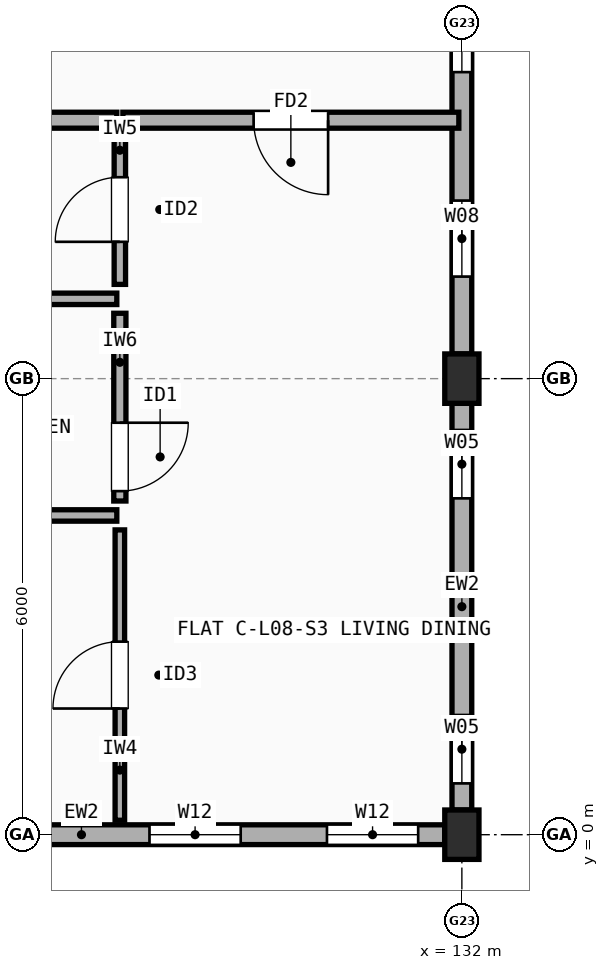
"""IFC4 building model, lengths in metres.
Left out: names, types, materials, properties, quantities, classifications, styles, units other than length and angle.
Written with IfcOpenShell. Run it as: python <this file> out.ifc"""

import sys

from ifc_helpers import new_model, si_unit, direction, frame, frame_2d, origin, origin_2d, place, context, subcontext, project, spatial, rectangle, extrude, element, fill, save


model = new_model("IFC4")
c1 = context("Model", 3, precision=1e-05, world=origin(), true_north=direction((0.0, 1.0)))
c2 = subcontext(c1, "Body", "Model", "MODEL_VIEW")
j1 = project(units=[si_unit("LENGTHUNIT", "METRE"), si_unit("PLANEANGLEUNIT", "RADIAN")], contexts=[c1])
p1 = place(None, origin())
s1 = spatial("IfcSite", under=j1, at=p1, CompositionType="ELEMENT")
p2 = place(p1, origin())
s2 = spatial("IfcBuilding", under=s1, at=p2, CompositionType="ELEMENT")
p3 = place(p2, frame((0.0, 0.0, 26.9)))
s3 = spatial("IfcBuildingStorey", under=s2, at=p3, CompositionType="ELEMENT", Elevation=26.9)
for number, where, z_axis, x_axis in (
    (1, (132.0, 0.0, 0.0), (0.0, 0.0, 1.0), (1.0, 0.0, 0.0)),
    (2, (132.0, 6.0, 0.0), (0.0, 0.0, 1.0), (1.0, 0.0, 0.0)),
):
    element("IfcColumn", number, at=place(p3, frame(where, z_axis=z_axis, x_axis=x_axis)), inside=s3, PredefinedType="COLUMN", context=c2, shape_type="SweptSolid", body=[
        extrude(rectangle(XDim=0.45, YDim=0.65, at=origin_2d()), origin(), (0.0, 0.0, 1.0), 2.98),
    ])
p4 = place(p3, frame((126.25, 0.0, 0.0), z_axis=(0.0, 0.0, 1.0), x_axis=(1.0, 0.0, 0.0)))
e3 = element("IfcWall", 3, at=p4, inside=s3, PredefinedType="STANDARD", context=c2, shape_type="SweptSolid", body=[
    extrude(rectangle(XDim=5.525, YDim=0.26, at=frame_2d((2.762, 0.0))), origin(), (0.0, 0.0, 1.0), 2.462),
])
p5 = place(p4, frame((1.64, 0.0, 0.9)))
e4 = element("IfcOpeningElement", 4, at=p5, cuts=e3, PredefinedType="OPENING", context=c2, shape_type="SweptSolid", body=[
    extrude(rectangle(XDim=1.2, YDim=1.35, at=frame_2d((0.6, 0.675))), frame((0.0, 0.14, 0.0), z_axis=(0.0, -1.0, 0.0), x_axis=(1.0, 0.0, 0.0)), (0.0, 0.0, 1.0), 0.28),
])
p6 = place(p4, frame((3.975, 0.0, 0.9)))
e5 = element("IfcOpeningElement", 5, at=p6, cuts=e3, PredefinedType="OPENING", context=c2, shape_type="SweptSolid", body=[
    extrude(rectangle(XDim=1.2, YDim=1.35, at=frame_2d((0.6, 0.675))), frame((0.0, 0.14, 0.0), z_axis=(0.0, -1.0, 0.0), x_axis=(1.0, 0.0, 0.0)), (0.0, 0.0, 1.0), 0.28),
])
p7 = place(p3, frame((132.0, 0.325, 0.0), z_axis=(0.0, 0.0, 1.0), x_axis=(0.0, 1.0, 0.0)))
e6 = element("IfcWall", 6, at=p7, inside=s3, PredefinedType="STANDARD", context=c2, shape_type="SweptSolid", body=[
    extrude(rectangle(XDim=5.35, YDim=0.26, at=frame_2d((2.675, 0.0))), origin(), (0.0, 0.0, 1.0), 2.462),
])
p8 = place(p7, frame((0.35, 0.0, 0.9)))
e7 = element("IfcOpeningElement", 7, at=p8, cuts=e6, PredefinedType="OPENING", context=c2, shape_type="SweptSolid", body=[
    extrude(rectangle(XDim=0.9, YDim=1.4, at=frame_2d((0.45, 0.7))), frame((0.0, 0.14, 0.0), z_axis=(0.0, -1.0, 0.0), x_axis=(1.0, 0.0, 0.0)), (0.0, 0.0, 1.0), 0.28),
])
p9 = place(p7, frame((4.1, 0.0, 0.9)))
e8 = element("IfcOpeningElement", 8, at=p9, cuts=e6, PredefinedType="OPENING", context=c2, shape_type="SweptSolid", body=[
    extrude(rectangle(XDim=0.9, YDim=1.4, at=frame_2d((0.45, 0.7))), frame((0.0, 0.14, 0.0), z_axis=(0.0, -1.0, 0.0), x_axis=(1.0, 0.0, 0.0)), (0.0, 0.0, 1.0), 0.28),
])
p10 = place(p3, frame((132.0, 6.325, 0.0), z_axis=(0.0, 0.0, 1.0), x_axis=(0.0, 1.0, 0.0)))
e9 = element("IfcWall", 9, at=p10, inside=s3, PredefinedType="STANDARD", context=c2, shape_type="SweptSolid", body=[
    extrude(rectangle(XDim=5.35, YDim=0.26, at=frame_2d((2.675, 0.0))), origin(), (0.0, 0.0, 1.0), 2.462),
])
p11 = place(p10, frame((1.018, 0.0, 0.9)))
e10 = element("IfcOpeningElement", 10, at=p11, cuts=e9, PredefinedType="OPENING", context=c2, shape_type="SweptSolid", body=[
    extrude(rectangle(XDim=1.0, YDim=1.4, at=frame_2d((0.5, 0.7))), frame((0.0, 0.14, 0.0), z_axis=(0.0, -1.0, 0.0), x_axis=(1.0, 0.0, 0.0)), (0.0, 0.0, 1.0), 0.28),
])
p12 = place(p10, frame((3.708, 0.0, 0.9)))
e11 = element("IfcOpeningElement", 11, at=p12, cuts=e9, PredefinedType="OPENING", context=c2, shape_type="SweptSolid", body=[
    extrude(rectangle(XDim=1.05, YDim=1.35, at=frame_2d((0.525, 0.675))), frame((0.0, 0.14, 0.0), z_axis=(0.0, -1.0, 0.0), x_axis=(1.0, 0.0, 0.0)), (0.0, 0.0, 1.0), 0.28),
])
p13 = place(p3, frame((123.04, 9.4, 0.0), z_axis=(0.0, 0.0, 1.0), x_axis=(1.0, 0.0, 0.0)))
e12 = element("IfcWall", 12, at=p13, inside=s3, PredefinedType="SOLIDWALL", context=c2, shape_type="SweptSolid", body=[
    extrude(rectangle(XDim=4.42, YDim=0.21, at=frame_2d((2.21, 0.0))), origin(), (0.0, 0.0, 1.0), 2.508),
])
p14 = place(p3, frame((127.54, 9.4, 0.0), z_axis=(0.0, 0.0, 1.0), x_axis=(1.0, 0.0, 0.0)))
e13 = element("IfcWall", 13, at=p14, inside=s3, PredefinedType="SOLIDWALL", context=c2, shape_type="SweptSolid", body=[
    extrude(rectangle(XDim=4.42, YDim=0.21, at=frame_2d((2.21, 0.0))), origin(), (0.0, 0.0, 1.0), 2.462),
])
p15 = place(p14, frame((1.72, 0.0, 0.0)))
e14 = element("IfcOpeningElement", 14, at=p15, cuts=e13, PredefinedType="OPENING", context=c2, shape_type="SweptSolid", body=[
    extrude(rectangle(XDim=0.98, YDim=2.15, at=frame_2d((0.49, 1.075))), frame((0.0, 0.115, 0.0), z_axis=(0.0, -1.0, 0.0), x_axis=(1.0, 0.0, 0.0)), (0.0, 0.0, 1.0), 0.23),
])
p16 = place(p3, frame((127.5, 0.19, 0.0), z_axis=(0.0, 0.0, 1.0), x_axis=(0.0, 1.0, 0.0)))
e15 = element("IfcWall", 15, at=p16, inside=s3, PredefinedType="PARTITIONING", context=c2, shape_type="SweptSolid", body=[
    extrude(rectangle(XDim=3.82, YDim=0.125, at=frame_2d((1.91, 0.0))), origin(), (0.0, 0.0, 1.0), 2.98),
])
p17 = place(p16, frame((1.47, 0.0, 0.0)))
e16 = element("IfcOpeningElement", 16, at=p17, cuts=e15, PredefinedType="OPENING", context=c2, shape_type="SweptSolid", body=[
    extrude(rectangle(XDim=0.88, YDim=2.1, at=frame_2d((0.44, 1.05))), frame((0.0, 0.073, 0.0), z_axis=(0.0, -1.0, 0.0), x_axis=(1.0, 0.0, 0.0)), (0.0, 0.0, 1.0), 0.145),
])
p18 = place(p3, frame((127.5, 4.39, 0.0), z_axis=(0.0, 0.0, 1.0), x_axis=(0.0, 1.0, 0.0)))
e17 = element("IfcWall", 17, at=p18, inside=s3, PredefinedType="PLUMBINGWALL", context=c2, shape_type="SweptSolid", body=[
    extrude(rectangle(XDim=2.47, YDim=0.16, at=frame_2d((1.235, 0.0))), origin(), (0.0, 0.0, 1.0), 2.462),
])
p19 = place(p18, frame((0.13, 0.0, 0.0)))
e18 = element("IfcOpeningElement", 18, at=p19, cuts=e17, PredefinedType="OPENING", context=c2, shape_type="SweptSolid", body=[
    extrude(rectangle(XDim=0.9, YDim=2.1, at=frame_2d((0.45, 1.05))), frame((0.0, 0.09, 0.0), z_axis=(0.0, -1.0, 0.0), x_axis=(1.0, 0.0, 0.0)), (0.0, 0.0, 1.0), 0.18),
])
p20 = place(p3, frame((127.5, 7.24, 0.0), z_axis=(0.0, 0.0, 1.0), x_axis=(0.0, 1.0, 0.0)))
e19 = element("IfcWall", 19, at=p20, inside=s3, PredefinedType="PARTITIONING", context=c2, shape_type="SweptSolid", body=[
    extrude(rectangle(XDim=1.97, YDim=0.15, at=frame_2d((0.985, 0.0))), origin(), (0.0, 0.0, 1.0), 2.98),
])
p21 = place(p20, frame((0.56, 0.0, 0.0)))
e20 = element("IfcOpeningElement", 20, at=p21, cuts=e19, PredefinedType="OPENING", context=c2, shape_type="SweptSolid", body=[
    extrude(rectangle(XDim=0.85, YDim=2.1, at=frame_2d((0.425, 1.05))), frame((0.0, 0.085, 0.0), z_axis=(0.0, -1.0, 0.0), x_axis=(1.0, 0.0, 0.0)), (0.0, 0.0, 1.0), 0.17),
])
p22 = place(p3, frame((123.04, 4.2, 0.0), z_axis=(0.0, 0.0, 1.0), x_axis=(1.0, 0.0, 0.0)))
e21 = element("IfcWall", 21, at=p22, inside=s3, PredefinedType="PARTITIONING", context=c2, shape_type="SweptSolid", body=[
    extrude(rectangle(XDim=4.42, YDim=0.15, at=frame_2d((2.21, 0.0))), origin(), (0.0, 0.0, 1.0), 2.548),
])
p23 = place(p3, frame((123.04, 7.05, 0.0), z_axis=(0.0, 0.0, 1.0), x_axis=(1.0, 0.0, 0.0)))
e22 = element("IfcWall", 22, at=p23, inside=s3, PredefinedType="PARTITIONING", context=c2, shape_type="SweptSolid", body=[
    extrude(rectangle(XDim=4.42, YDim=0.15, at=frame_2d((2.21, 0.0))), origin(), (0.0, 0.0, 1.0), 2.508),
])
p24 = place(p5, origin())
e23 = element("IfcWindow", 23, at=p24, inside=s3, PartitioningType="SINGLE_PANEL", PredefinedType="WINDOW", context=c2, shape_type="SweptSolid", body=[
    extrude(rectangle(XDim=1.2, YDim=1.35, at=frame_2d((0.6, 0.675))), frame((0.0, 0.03, 0.0), z_axis=(0.0, -1.0, 0.0), x_axis=(1.0, 0.0, 0.0)), (0.0, 0.0, 1.0), 0.06),
])
fill(e4, e23)
p25 = place(p6, origin())
e24 = element("IfcWindow", 24, at=p25, inside=s3, PartitioningType="SINGLE_PANEL", PredefinedType="WINDOW", context=c2, shape_type="SweptSolid", body=[
    extrude(rectangle(XDim=1.2, YDim=1.35, at=frame_2d((0.6, 0.675))), frame((0.0, 0.03, 0.0), z_axis=(0.0, -1.0, 0.0), x_axis=(1.0, 0.0, 0.0)), (0.0, 0.0, 1.0), 0.06),
])
fill(e5, e24)
p26 = place(p8, origin())
e25 = element("IfcWindow", 25, at=p26, inside=s3, PartitioningType="SINGLE_PANEL", PredefinedType="WINDOW", context=c2, shape_type="SweptSolid", body=[
    extrude(rectangle(XDim=0.9, YDim=1.4, at=frame_2d((0.45, 0.7))), frame((0.0, 0.03, 0.0), z_axis=(0.0, -1.0, 0.0), x_axis=(1.0, 0.0, 0.0)), (0.0, 0.0, 1.0), 0.06),
])
fill(e7, e25)
p27 = place(p9, origin())
e26 = element("IfcWindow", 26, at=p27, inside=s3, PartitioningType="SINGLE_PANEL", PredefinedType="WINDOW", context=c2, shape_type="SweptSolid", body=[
    extrude(rectangle(XDim=0.9, YDim=1.4, at=frame_2d((0.45, 0.7))), frame((0.0, 0.03, 0.0), z_axis=(0.0, -1.0, 0.0), x_axis=(1.0, 0.0, 0.0)), (0.0, 0.0, 1.0), 0.06),
])
fill(e8, e26)
p28 = place(p11, origin())
e27 = element("IfcWindow", 27, at=p28, inside=s3, PartitioningType="SINGLE_PANEL", PredefinedType="WINDOW", context=c2, shape_type="SweptSolid", body=[
    extrude(rectangle(XDim=1.0, YDim=1.4, at=frame_2d((0.5, 0.7))), frame((0.0, 0.03, 0.0), z_axis=(0.0, -1.0, 0.0), x_axis=(1.0, 0.0, 0.0)), (0.0, 0.0, 1.0), 0.06),
])
fill(e10, e27)
p29 = place(p12, origin())
e28 = element("IfcWindow", 28, at=p29, inside=s3, PartitioningType="SINGLE_PANEL", PredefinedType="WINDOW", context=c2, shape_type="SweptSolid", body=[
    extrude(rectangle(XDim=1.05, YDim=1.35, at=frame_2d((0.525, 0.675))), frame((0.0, 0.03, 0.0), z_axis=(0.0, -1.0, 0.0), x_axis=(1.0, 0.0, 0.0)), (0.0, 0.0, 1.0), 0.06),
])
fill(e11, e28)
p30 = place(p15, origin())
e29 = element("IfcDoor", 29, at=p30, inside=s3, OperationType="SINGLE_SWING_RIGHT", PredefinedType="DOOR", context=c2, shape_type="SweptSolid", body=[
    extrude(rectangle(XDim=0.98, YDim=2.15, at=frame_2d((0.49, 1.075))), frame((0.0, 0.025, 0.0), z_axis=(0.0, -1.0, 0.0), x_axis=(1.0, 0.0, 0.0)), (0.0, 0.0, 1.0), 0.05),
])
fill(e14, e29)
p31 = place(p17, origin())
e30 = element("IfcDoor", 30, at=p31, inside=s3, OperationType="SINGLE_SWING_LEFT", PredefinedType="DOOR", context=c2, shape_type="SweptSolid", body=[
    extrude(rectangle(XDim=0.88, YDim=2.1, at=frame_2d((0.44, 1.05))), frame((0.0, 0.025, 0.0), z_axis=(0.0, -1.0, 0.0), x_axis=(1.0, 0.0, 0.0)), (0.0, 0.0, 1.0), 0.05),
])
fill(e16, e30)
p32 = place(p19, origin())
e31 = element("IfcDoor", 31, at=p32, inside=s3, OperationType="SINGLE_SWING_RIGHT", PredefinedType="DOOR", context=c2, shape_type="SweptSolid", body=[
    extrude(rectangle(XDim=0.9, YDim=2.1, at=frame_2d((0.45, 1.05))), frame((0.0, 0.025, 0.0), z_axis=(0.0, -1.0, 0.0), x_axis=(1.0, 0.0, 0.0)), (0.0, 0.0, 1.0), 0.05),
])
fill(e18, e31)
p33 = place(p21, origin())
e32 = element("IfcDoor", 32, at=p33, inside=s3, OperationType="SINGLE_SWING_LEFT", PredefinedType="DOOR", context=c2, shape_type="SweptSolid", body=[
    extrude(rectangle(XDim=0.85, YDim=2.1, at=frame_2d((0.425, 1.05))), frame((0.0, 0.025, 0.0), z_axis=(0.0, -1.0, 0.0), x_axis=(1.0, 0.0, 0.0)), (0.0, 0.0, 1.0), 0.05),
])
fill(e20, e32)
save(model, sys.argv[1])
